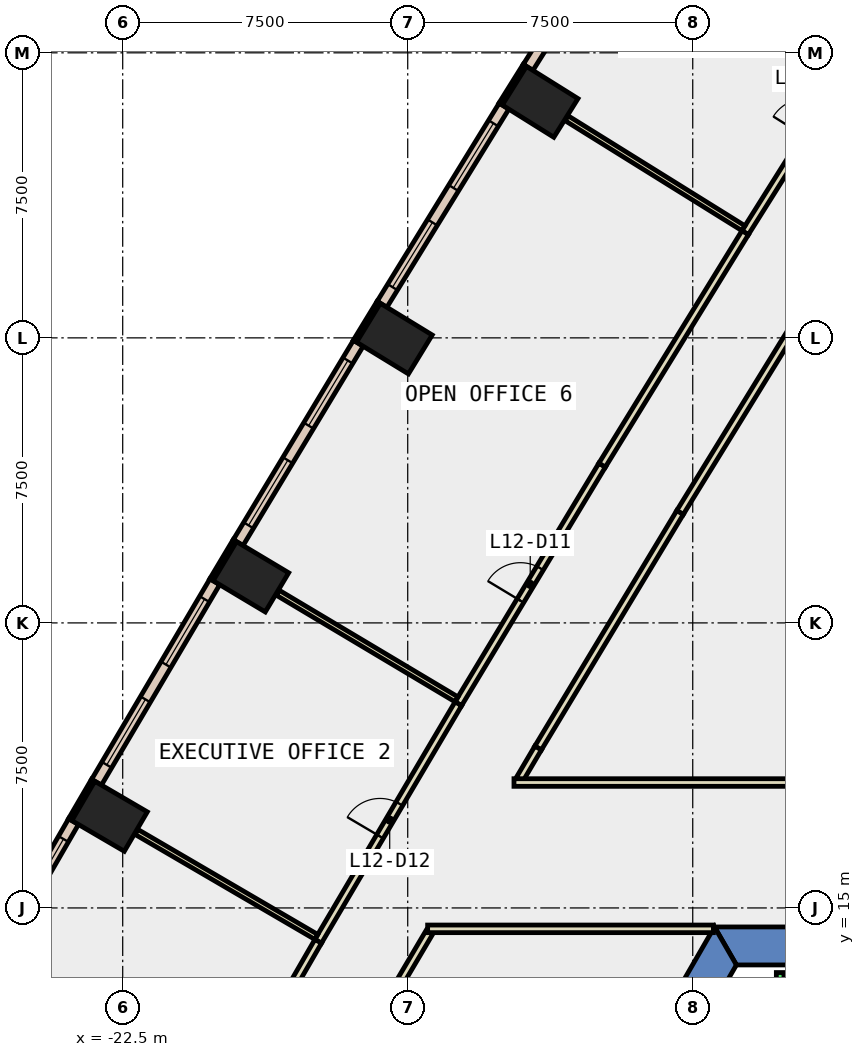
"""IFC4 building model, lengths in metres.
Left out: names, types, materials, properties, quantities, classifications, styles, units other than length and angle.
Written with IfcOpenShell. Run it as: python <this file> out.ifc"""

import sys

from ifc_helpers import new_model, si_unit, direction, frame, frame_2d, origin, origin_2d, place, context, subcontext, project, spatial, polyline, rectangle, outline, extrude, element, fill, save


model = new_model("IFC4")
c1 = context("Model", 3, precision=1e-05, world=origin(), true_north=direction((0.0, 1.0)))
c2 = subcontext(c1, "Body", "Model", "MODEL_VIEW")
j1 = project(units=[si_unit("LENGTHUNIT", "METRE"), si_unit("PLANEANGLEUNIT", "RADIAN")], contexts=[c1])
p1 = place(None, origin())
s1 = spatial("IfcSite", under=j1, at=p1, CompositionType="ELEMENT")
p2 = place(p1, origin())
s2 = spatial("IfcBuilding", under=s1, at=p2, CompositionType="ELEMENT")
p3 = place(p2, frame((0.0, 0.0, 60.2)))
s3 = spatial("IfcBuildingStorey", under=s2, at=p3, CompositionType="ELEMENT", Elevation=60.2)
for number, where, z_axis, x_axis in (
    (1, (-11.516, 36.211, -0.4), (0.0, 0.0, 1.0), (0.53, 0.848, 0.0)),
    (2, (-15.351, 29.981, -0.4), (0.0, 0.0, 1.0), (0.522, 0.853, 0.0)),
    (3, (-19.127, 23.714, -0.4), (0.0, 0.0, 1.0), (0.513, 0.858, 0.0)),
    (4, (-22.846, 17.413, -0.4), (0.0, 0.0, 1.0), (0.504, 0.864, 0.0)),
):
    element("IfcColumn", number, at=place(p3, frame(where, z_axis=z_axis, x_axis=x_axis)), inside=s3, PredefinedType="COLUMN", context=c2, shape_type="SweptSolid", body=[
        extrude(rectangle(XDim=1.2, YDim=1.6, at=origin_2d()), origin(), (0.0, 0.0, 1.0), 4.2),
    ])
p4 = place(p3, frame((0.0, 0.0, -0.4)))
e5 = element("IfcWall", 5, at=p4, inside=s3, PredefinedType="SHEAR", context=c2, shape_type="SweptSolid", body=[
    extrude(outline(polyline([(-4.55, 13.5), (-4.55, 14.5), (-6.928, 14.5), (-6.351, 13.5), (-4.55, 13.5)])), origin(), (0.0, 0.0, 1.0), 4.2),
])
p5 = place(p3, frame((0.0, 0.0, -0.4)))
e6 = element("IfcWall", 6, at=p5, inside=s3, PredefinedType="SHEAR", context=c2, shape_type="SweptSolid", body=[
    extrude(outline(polyline([(-12.267, 5.252), (-11.402, 4.752), (-6.351, 13.5), (-6.928, 14.5), (-12.267, 5.252)])), origin(), (0.0, 0.0, 1.0), 4.2),
])
p6 = place(p3, frame((-11.919, 37.17, 0.0), z_axis=(0.0, 0.0, 1.0), x_axis=(-0.530273374944, -0.847826720401, 0.0)))
e7 = element("IfcWall", 7, at=p6, inside=s3, PredefinedType="STANDARD", context=c2, shape_type="SweptSolid", body=[
    extrude(rectangle(XDim=1.199, YDim=0.1, at=frame_2d((0.6, 0.0))), origin(), (0.0, 0.0, 1.0), 3.8),
])
for number, where, z_axis, x_axis in (
    (8, (-15.763, 30.936, 0.0), (0.0, 0.0, 1.0), (-0.522, -0.853, 0.0)),
    (9, (-19.549, 24.665, 0.0), (0.0, 0.0, 1.0), (-0.513, -0.858, 0.0)),
):
    element("IfcWall", number, at=place(p3, frame(where, z_axis=z_axis, x_axis=x_axis)), inside=s3, PredefinedType="STANDARD", context=c2, shape_type="SweptSolid", body=[
        extrude(rectangle(XDim=1.2, YDim=0.1, at=frame_2d((0.6, 0.0))), origin(), (0.0, 0.0, 1.0), 3.8),
    ])
p7 = place(p3, frame((-23.277, 18.36, 0.0), z_axis=(0.0, 0.0, 1.0), x_axis=(-0.504225229382, -0.863572184623, 0.0)))
e10 = element("IfcWall", 10, at=p7, inside=s3, PredefinedType="STANDARD", context=c2, shape_type="SweptSolid", body=[
    extrude(rectangle(XDim=1.2, YDim=0.1, at=frame_2d((0.6, 0.0))), origin(), (0.0, 0.0, 1.0), 3.8),
])
p8 = place(p3, frame((-8.523, 42.38, 0.0), z_axis=(0.0, 0.0, 1.0), x_axis=(-0.532322705893, -0.846541515102, 0.0)))
e11 = element("IfcWall", 11, at=p8, inside=s3, PredefinedType="STANDARD", context=c2, shape_type="SweptSolid", body=[
    extrude(rectangle(XDim=6.218, YDim=0.3, at=frame_2d((3.109, 0.0))), origin(), (0.0, 0.0, 1.0), 3.8),
])
p9 = place(p8, frame((0.555, 0.0, 0.9)))
e12 = element("IfcOpeningElement", 12, at=p9, cuts=e11, PredefinedType="OPENING", context=c2, shape_type="SweptSolid", body=[
    extrude(rectangle(XDim=2.0, YDim=2.6, at=frame_2d((1.0, 1.3))), frame((0.0, 0.16, 0.0), z_axis=(0.0, -1.0, 0.0), x_axis=(1.0, 0.0, 0.0)), (0.0, 0.0, 1.0), 0.32),
])
p10 = place(p8, frame((3.664, 0.0, 0.9)))
e13 = element("IfcOpeningElement", 13, at=p10, cuts=e11, PredefinedType="OPENING", context=c2, shape_type="SweptSolid", body=[
    extrude(rectangle(XDim=2.0, YDim=2.6, at=frame_2d((1.0, 1.3))), frame((0.0, 0.16, 0.0), z_axis=(0.0, -1.0, 0.0), x_axis=(1.0, 0.0, 0.0)), (0.0, 0.0, 1.0), 0.32),
])
p11 = place(p3, frame((-12.466, 36.098, 0.0), z_axis=(0.0, 0.0, 1.0), x_axis=(-0.524239751329, -0.851570715282, 0.0)))
e14 = element("IfcWall", 14, at=p11, inside=s3, PredefinedType="STANDARD", context=c2, shape_type="SweptSolid", body=[
    extrude(rectangle(XDim=6.125, YDim=0.3, at=frame_2d((3.062, 0.0))), origin(), (0.0, 0.0, 1.0), 3.8),
])
p12 = place(p11, frame((0.531, 0.0, 0.9)))
e15 = element("IfcOpeningElement", 15, at=p12, cuts=e14, PredefinedType="OPENING", context=c2, shape_type="SweptSolid", body=[
    extrude(rectangle(XDim=2.0, YDim=2.6, at=frame_2d((1.0, 1.3))), frame((0.0, 0.16, 0.0), z_axis=(0.0, -1.0, 0.0), x_axis=(1.0, 0.0, 0.0)), (0.0, 0.0, 1.0), 0.32),
])
p13 = place(p11, frame((3.594, 0.0, 0.9)))
e16 = element("IfcOpeningElement", 16, at=p13, cuts=e14, PredefinedType="OPENING", context=c2, shape_type="SweptSolid", body=[
    extrude(rectangle(XDim=2.0, YDim=2.6, at=frame_2d((1.0, 1.3))), frame((0.0, 0.16, 0.0), z_axis=(0.0, -1.0, 0.0), x_axis=(1.0, 0.0, 0.0)), (0.0, 0.0, 1.0), 0.32),
])
p14 = place(p3, frame((-16.3, 29.859, 0.0), z_axis=(0.0, 0.0, 1.0), x_axis=(-0.516147563478, -0.856499674674, 0.0)))
e17 = element("IfcWall", 17, at=p14, inside=s3, PredefinedType="STANDARD", context=c2, shape_type="SweptSolid", body=[
    extrude(rectangle(XDim=6.126, YDim=0.3, at=frame_2d((3.063, 0.0))), origin(), (0.0, 0.0, 1.0), 3.8),
])
p15 = place(p14, frame((0.532, 0.0, 0.9)))
e18 = element("IfcOpeningElement", 18, at=p15, cuts=e17, PredefinedType="OPENING", context=c2, shape_type="SweptSolid", body=[
    extrude(rectangle(XDim=2.0, YDim=2.6, at=frame_2d((1.0, 1.3))), frame((0.0, 0.16, 0.0), z_axis=(0.0, -1.0, 0.0), x_axis=(1.0, 0.0, 0.0)), (0.0, 0.0, 1.0), 0.32),
])
p16 = place(p14, frame((3.595, 0.0, 0.9)))
e19 = element("IfcOpeningElement", 19, at=p16, cuts=e17, PredefinedType="OPENING", context=c2, shape_type="SweptSolid", body=[
    extrude(rectangle(XDim=2.0, YDim=2.6, at=frame_2d((1.0, 1.3))), frame((0.0, 0.16, 0.0), z_axis=(0.0, -1.0, 0.0), x_axis=(1.0, 0.0, 0.0)), (0.0, 0.0, 1.0), 0.32),
])
p17 = place(p3, frame((-20.076, 23.583, 0.0), z_axis=(0.0, 0.0, 1.0), x_axis=(-0.508163938648, -0.861260362177, 0.0)))
e20 = element("IfcWall", 20, at=p17, inside=s3, PredefinedType="STANDARD", context=c2, shape_type="SweptSolid", body=[
    extrude(rectangle(XDim=6.126, YDim=0.3, at=frame_2d((3.063, 0.0))), origin(), (0.0, 0.0, 1.0), 3.8),
])
p18 = place(p17, frame((0.531, 0.0, 0.9)))
e21 = element("IfcOpeningElement", 21, at=p18, cuts=e20, PredefinedType="OPENING", context=c2, shape_type="SweptSolid", body=[
    extrude(rectangle(XDim=2.0, YDim=2.6, at=frame_2d((1.0, 1.3))), frame((0.0, 0.16, 0.0), z_axis=(0.0, -1.0, 0.0), x_axis=(1.0, 0.0, 0.0)), (0.0, 0.0, 1.0), 0.32),
])
p19 = place(p17, frame((3.594, 0.0, 0.9)))
e22 = element("IfcOpeningElement", 22, at=p19, cuts=e20, PredefinedType="OPENING", context=c2, shape_type="SweptSolid", body=[
    extrude(rectangle(XDim=2.0, YDim=2.6, at=frame_2d((1.0, 1.3))), frame((0.0, 0.16, 0.0), z_axis=(0.0, -1.0, 0.0), x_axis=(1.0, 0.0, 0.0)), (0.0, 0.0, 1.0), 0.32),
])
p20 = place(p3, frame((-23.793, 17.273, 0.0), z_axis=(0.0, 0.0, 1.0), x_axis=(-0.499903021601, -0.86608138705, 0.0)))
e23 = element("IfcWall", 23, at=p20, inside=s3, PredefinedType="STANDARD", context=c2, shape_type="SweptSolid", body=[
    extrude(rectangle(XDim=6.125, YDim=0.3, at=frame_2d((3.062, 0.0))), origin(), (0.0, 0.0, 1.0), 3.8),
])
p21 = place(p20, frame((0.531, 0.0, 0.9)))
e24 = element("IfcOpeningElement", 24, at=p21, cuts=e23, PredefinedType="OPENING", context=c2, shape_type="SweptSolid", body=[
    extrude(rectangle(XDim=2.0, YDim=2.6, at=frame_2d((1.0, 1.3))), frame((0.0, 0.16, 0.0), z_axis=(0.0, -1.0, 0.0), x_axis=(1.0, 0.0, 0.0)), (0.0, 0.0, 1.0), 0.32),
])
p22 = place(p20, frame((3.594, 0.0, 0.9)))
e25 = element("IfcOpeningElement", 25, at=p22, cuts=e23, PredefinedType="OPENING", context=c2, shape_type="SweptSolid", body=[
    extrude(rectangle(XDim=2.0, YDim=2.6, at=frame_2d((1.0, 1.3))), frame((0.0, 0.16, 0.0), z_axis=(0.0, -1.0, 0.0), x_axis=(1.0, 0.0, 0.0)), (0.0, 0.0, 1.0), 0.32),
])
p23 = place(p3, frame((-14.427, 14.364, 0.0), z_axis=(0.0, 0.0, 1.0), x_axis=(-0.508509719672, -0.861056249614, 0.0)))
e26 = element("IfcWall", 26, at=p23, inside=s3, PredefinedType="PARTITIONING", context=c2, shape_type="SweptSolid", body=[
    extrude(rectangle(XDim=1.611, YDim=0.2, at=frame_2d((0.805, 0.0))), origin(), (0.0, 0.0, 1.0), 3.8),
])
p24 = place(p3, frame((-4.043, 31.564, 0.0), z_axis=(0.0, 0.0, 1.0), x_axis=(-0.524225471951, -0.851579505717, 0.0)))
e27 = element("IfcWall", 27, at=p24, inside=s3, PredefinedType="PARTITIONING", context=c2, shape_type="SweptSolid", body=[
    extrude(rectangle(XDim=7.233, YDim=0.2, at=frame_2d((3.617, 0.0))), origin(), (0.0, 0.0, 1.0), 3.8),
])
p25 = place(p3, frame((-7.835, 25.404, 0.0), z_axis=(0.0, 0.0, 1.0), x_axis=(-0.516172233954, -0.85648480716, 0.0)))
e28 = element("IfcWall", 28, at=p25, inside=s3, PredefinedType="PARTITIONING", context=c2, shape_type="SweptSolid", body=[
    extrude(rectangle(XDim=7.234, YDim=0.2, at=frame_2d((3.617, 0.0))), origin(), (0.0, 0.0, 1.0), 3.8),
])
p26 = place(p3, frame((-11.569, 19.208, 0.0), z_axis=(0.0, 0.0, 1.0), x_axis=(-0.508048285953, -0.861328589529, 0.0)))
e29 = element("IfcWall", 29, at=p26, inside=s3, PredefinedType="PARTITIONING", context=c2, shape_type="SweptSolid", body=[
    extrude(rectangle(XDim=0.954, YDim=0.2, at=frame_2d((0.477, 0.0))), origin(), (0.0, 0.0, 1.0), 3.8),
])
p27 = place(p3, frame((-6.121, 32.768, 0.0), z_axis=(0.0, 0.0, 1.0), x_axis=(0.532309351336, 0.846549912574, 0.0)))
e30 = element("IfcWall", 30, at=p27, inside=s3, PredefinedType="PARTITIONING", context=c2, shape_type="SweptSolid", body=[
    extrude(rectangle(XDim=6.966, YDim=0.2, at=frame_2d((3.483, 0.0))), origin(), (0.0, 0.0, 1.0), 3.8),
])
p28 = place(p27, frame((2.983, 0.0, 0.0)))
e31 = element("IfcOpeningElement", 31, at=p28, cuts=e30, PredefinedType="OPENING", context=c2, shape_type="SweptSolid", body=[
    extrude(rectangle(XDim=1.0, YDim=2.1, at=frame_2d((0.5, 1.05))), frame((0.0, 0.11, 0.0), z_axis=(0.0, -1.0, 0.0), x_axis=(1.0, 0.0, 0.0)), (0.0, 0.0, 1.0), 0.22),
])
p29 = place(p3, frame((-13.669, 20.373, 0.0), z_axis=(0.0, 0.0, 1.0), x_axis=(0.516247820136, 0.85643924957, 0.0)))
e32 = element("IfcWall", 32, at=p29, inside=s3, PredefinedType="PARTITIONING", context=c2, shape_type="SweptSolid", body=[
    extrude(rectangle(XDim=7.332, YDim=0.2, at=frame_2d((3.666, 0.0))), origin(), (0.0, 0.0, 1.0), 3.8),
])
p30 = place(p29, frame((3.166, 0.0, 0.0)))
e33 = element("IfcOpeningElement", 33, at=p30, cuts=e32, PredefinedType="OPENING", context=c2, shape_type="SweptSolid", body=[
    extrude(rectangle(XDim=1.0, YDim=2.1, at=frame_2d((0.5, 1.05))), frame((0.0, 0.11, 0.0), z_axis=(0.0, -1.0, 0.0), x_axis=(1.0, 0.0, 0.0)), (0.0, 0.0, 1.0), 0.22),
])
p31 = place(p3, frame((-9.884, 26.652, 0.0), z_axis=(0.0, 0.0, 1.0), x_axis=(0.524182788618, 0.851605779758, 0.0)))
e34 = element("IfcWall", 34, at=p31, inside=s3, PredefinedType="PARTITIONING", context=c2, shape_type="SweptSolid", body=[
    extrude(rectangle(XDim=7.18, YDim=0.2, at=frame_2d((3.59, 0.0))), origin(), (0.0, 0.0, 1.0), 3.8),
])
p32 = place(p3, frame((-17.357, 14.122, 0.0), z_axis=(0.0, 0.0, 1.0), x_axis=(0.508298575594, 0.861180909014, 0.0)))
e35 = element("IfcWall", 35, at=p32, inside=s3, PredefinedType="PARTITIONING", context=c2, shape_type="SweptSolid", body=[
    extrude(rectangle(XDim=7.258, YDim=0.2, at=frame_2d((3.629, 0.0))), origin(), (0.0, 0.0, 1.0), 3.8),
])
p33 = place(p32, frame((3.204, 0.0, 0.0)))
e36 = element("IfcOpeningElement", 36, at=p33, cuts=e35, PredefinedType="OPENING", context=c2, shape_type="SweptSolid", body=[
    extrude(rectangle(XDim=1.0, YDim=2.1, at=frame_2d((0.5, 1.05))), frame((0.0, 0.11, 0.0), z_axis=(0.0, -1.0, 0.0), x_axis=(1.0, 0.0, 0.0)), (0.0, 0.0, 1.0), 0.22),
])
p34 = place(p3, frame((-17.356, 14.122, 0.0), z_axis=(0.0, 0.0, 1.0), x_axis=(-0.499946764175, -0.866056137321, 0.0)))
e37 = element("IfcWall", 37, at=p34, inside=s3, PredefinedType="PARTITIONING", context=c2, shape_type="SweptSolid", body=[
    extrude(rectangle(XDim=7.255, YDim=0.2, at=frame_2d((3.627, 0.0))), origin(), (0.0, 0.0, 1.0), 3.8),
])
p35 = place(p34, frame((3.052, 0.0, 0.0)))
e38 = element("IfcOpeningElement", 38, at=p35, cuts=e37, PredefinedType="OPENING", context=c2, shape_type="SweptSolid", body=[
    extrude(rectangle(XDim=1.0, YDim=2.1, at=frame_2d((0.5, 1.05))), frame((0.0, 0.11, 0.0), z_axis=(0.0, -1.0, 0.0), x_axis=(1.0, 0.0, 0.0)), (0.0, 0.0, 1.0), 0.22),
])
p36 = place(p3, frame((-6.957, 14.45, 0.0), z_axis=(0.0, 0.0, 1.0), x_axis=(-1.0, 0.0, 0.0)))
e39 = element("IfcWall", 39, at=p36, inside=s3, PredefinedType="PARTITIONING", context=c2, shape_type="SweptSolid", body=[
    extrude(rectangle(XDim=7.519, YDim=0.2, at=frame_2d((3.76, 0.0))), origin(), (0.0, 0.0, 1.0), 3.8),
])
p37 = place(p3, frame((-12.204, 18.3, 0.0), z_axis=(0.0, 0.0, 1.0), x_axis=(1.0, 0.0, 0.0)))
e40 = element("IfcWall", 40, at=p37, inside=s3, PredefinedType="PARTITIONING", context=c2, shape_type="SweptSolid", body=[
    extrude(rectangle(XDim=11.804, YDim=0.2, at=frame_2d((5.902, 0.0))), origin(), (0.0, 0.0, 1.0), 3.8),
])
p38 = place(p3, frame((-6.166, 32.885, 0.0), z_axis=(0.0, 0.0, 1.0), x_axis=(-0.84915518202, 0.528143424506, 0.0)))
e41 = element("IfcWall", 41, at=p38, inside=s3, PredefinedType="PARTITIONING", context=c2, shape_type="SweptSolid", body=[
    extrude(rectangle(XDim=5.48, YDim=0.15, at=frame_2d((2.74, 0.0))), origin(), (0.0, 0.0, 1.0), 3.8),
])
p39 = place(p3, frame((-13.716, 20.488, 0.0), z_axis=(0.0, 0.0, 1.0), x_axis=(-0.85883841868, 0.512246591594, 0.0)))
e42 = element("IfcWall", 42, at=p39, inside=s3, PredefinedType="PARTITIONING", context=c2, shape_type="SweptSolid", body=[
    extrude(rectangle(XDim=5.479, YDim=0.15, at=frame_2d((2.74, 0.0))), origin(), (0.0, 0.0, 1.0), 3.8),
])
p40 = place(p3, frame((-17.405, 14.237, 0.0), z_axis=(0.0, 0.0, 1.0), x_axis=(-0.863614048932, 0.504153522736, 0.0)))
e43 = element("IfcWall", 43, at=p40, inside=s3, PredefinedType="PARTITIONING", context=c2, shape_type="SweptSolid", body=[
    extrude(rectangle(XDim=5.48, YDim=0.15, at=frame_2d((2.74, 0.0))), origin(), (0.0, 0.0, 1.0), 3.8),
])
p41 = place(p3, frame((-5.2, 10.8, 0.0), z_axis=(0.0, 0.0, 1.0), x_axis=(0.0, 1.0, 0.0)))
e44 = element("IfcWall", 44, at=p41, inside=s3, PredefinedType="STANDARD", context=c2, shape_type="SweptSolid", body=[
    extrude(rectangle(XDim=2.5, YDim=0.2, at=frame_2d((1.25, 0.0))), origin(), (0.0, 0.0, 1.0), 3.8),
])
p42 = place(p12, origin())
e45 = element("IfcWindow", 45, at=p42, inside=s3, PartitioningType="SINGLE_PANEL", PredefinedType="WINDOW", context=c2, shape_type="SweptSolid", body=[
    extrude(rectangle(XDim=2.0, YDim=2.6, at=frame_2d((1.0, 1.3))), frame((0.0, 0.03, 0.0), z_axis=(0.0, -1.0, 0.0), x_axis=(1.0, 0.0, 0.0)), (0.0, 0.0, 1.0), 0.06),
])
fill(e15, e45)
p43 = place(p13, origin())
e46 = element("IfcWindow", 46, at=p43, inside=s3, PartitioningType="SINGLE_PANEL", PredefinedType="WINDOW", context=c2, shape_type="SweptSolid", body=[
    extrude(rectangle(XDim=2.0, YDim=2.6, at=frame_2d((1.0, 1.3))), frame((0.0, 0.03, 0.0), z_axis=(0.0, -1.0, 0.0), x_axis=(1.0, 0.0, 0.0)), (0.0, 0.0, 1.0), 0.06),
])
fill(e16, e46)
p44 = place(p15, origin())
e47 = element("IfcWindow", 47, at=p44, inside=s3, PartitioningType="SINGLE_PANEL", PredefinedType="WINDOW", context=c2, shape_type="SweptSolid", body=[
    extrude(rectangle(XDim=2.0, YDim=2.6, at=frame_2d((1.0, 1.3))), frame((0.0, 0.03, 0.0), z_axis=(0.0, -1.0, 0.0), x_axis=(1.0, 0.0, 0.0)), (0.0, 0.0, 1.0), 0.06),
])
fill(e18, e47)
p45 = place(p16, origin())
e48 = element("IfcWindow", 48, at=p45, inside=s3, PartitioningType="SINGLE_PANEL", PredefinedType="WINDOW", context=c2, shape_type="SweptSolid", body=[
    extrude(rectangle(XDim=2.0, YDim=2.6, at=frame_2d((1.0, 1.3))), frame((0.0, 0.03, 0.0), z_axis=(0.0, -1.0, 0.0), x_axis=(1.0, 0.0, 0.0)), (0.0, 0.0, 1.0), 0.06),
])
fill(e19, e48)
p46 = place(p18, origin())
e49 = element("IfcWindow", 49, at=p46, inside=s3, PartitioningType="SINGLE_PANEL", PredefinedType="WINDOW", context=c2, shape_type="SweptSolid", body=[
    extrude(rectangle(XDim=2.0, YDim=2.6, at=frame_2d((1.0, 1.3))), frame((0.0, 0.03, 0.0), z_axis=(0.0, -1.0, 0.0), x_axis=(1.0, 0.0, 0.0)), (0.0, 0.0, 1.0), 0.06),
])
fill(e21, e49)
p47 = place(p19, origin())
e50 = element("IfcWindow", 50, at=p47, inside=s3, PartitioningType="SINGLE_PANEL", PredefinedType="WINDOW", context=c2, shape_type="SweptSolid", body=[
    extrude(rectangle(XDim=2.0, YDim=2.6, at=frame_2d((1.0, 1.3))), frame((0.0, 0.03, 0.0), z_axis=(0.0, -1.0, 0.0), x_axis=(1.0, 0.0, 0.0)), (0.0, 0.0, 1.0), 0.06),
])
fill(e22, e50)
p48 = place(p21, origin())
e51 = element("IfcWindow", 51, at=p48, inside=s3, PartitioningType="SINGLE_PANEL", PredefinedType="WINDOW", context=c2, shape_type="SweptSolid", body=[
    extrude(rectangle(XDim=2.0, YDim=2.6, at=frame_2d((1.0, 1.3))), frame((0.0, 0.03, 0.0), z_axis=(0.0, -1.0, 0.0), x_axis=(1.0, 0.0, 0.0)), (0.0, 0.0, 1.0), 0.06),
])
fill(e24, e51)
p49 = place(p30, origin())
e52 = element("IfcDoor", 52, at=p49, inside=s3, OperationType="SINGLE_SWING_LEFT", PredefinedType="DOOR", context=c2, shape_type="SweptSolid", body=[
    extrude(rectangle(XDim=1.0, YDim=2.1, at=frame_2d((0.5, 1.05))), frame((0.0, 0.025, 0.0), z_axis=(0.0, -1.0, 0.0), x_axis=(1.0, 0.0, 0.0)), (0.0, 0.0, 1.0), 0.05),
])
fill(e33, e52)
p50 = place(p33, origin())
e53 = element("IfcDoor", 53, at=p50, inside=s3, OperationType="SINGLE_SWING_RIGHT", PredefinedType="DOOR", context=c2, shape_type="SweptSolid", body=[
    extrude(rectangle(XDim=1.0, YDim=2.1, at=frame_2d((0.5, 1.05))), frame((0.0, 0.025, 0.0), z_axis=(0.0, -1.0, 0.0), x_axis=(1.0, 0.0, 0.0)), (0.0, 0.0, 1.0), 0.05),
])
fill(e36, e53)
save(model, sys.argv[1])
